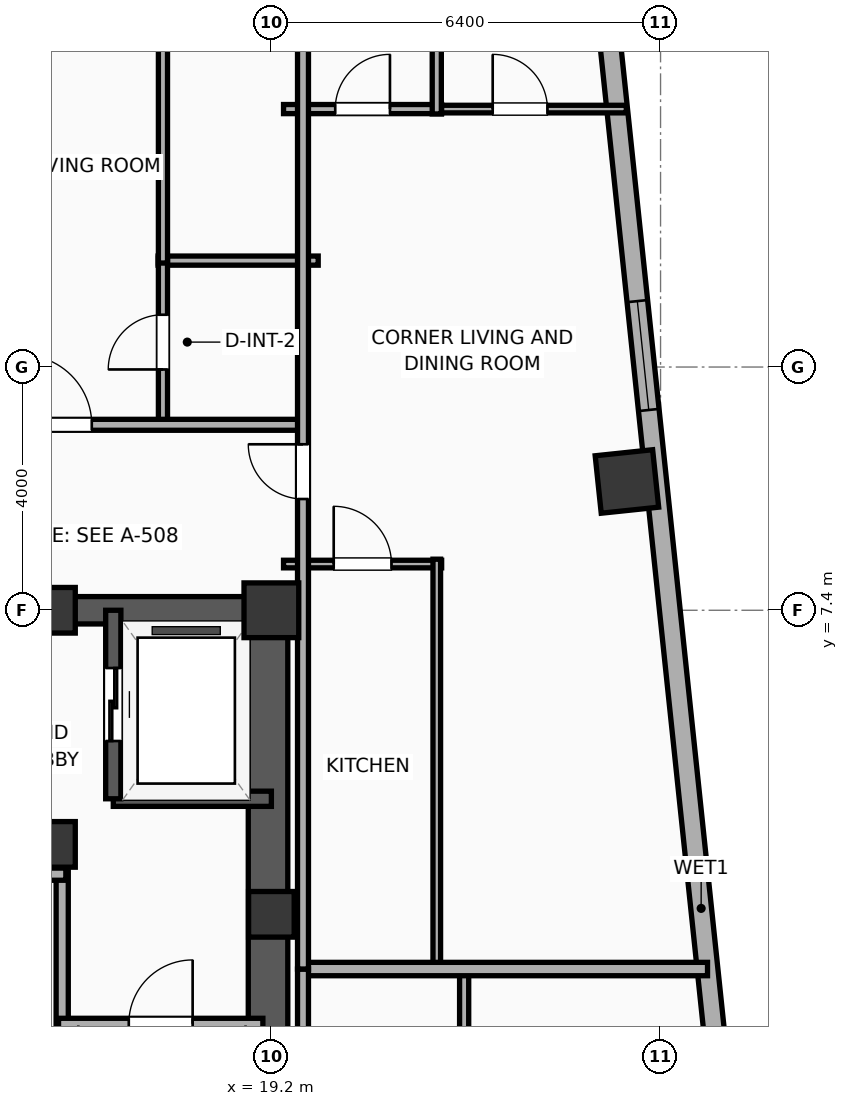
"""IFC4 building model, lengths in metres.
Left out: names, types, materials, properties, quantities, classifications, styles, units other than length and angle.
Written with IfcOpenShell. Run it as: python <this file> out.ifc"""

import sys

from ifc_helpers import new_model, si_unit, direction, frame, frame_2d, origin, origin_2d, place, context, subcontext, project, spatial, rectangle, hollow_rectangle, extrude, element, fill, save


model = new_model("IFC4")
c1 = context("Model", 3, precision=1e-05, world=origin(), true_north=direction((0.0, 1.0)))
c2 = subcontext(c1, "Body", "Model", "MODEL_VIEW")
j1 = project(units=[si_unit("LENGTHUNIT", "METRE"), si_unit("PLANEANGLEUNIT", "RADIAN")], contexts=[c1])
p1 = place(None, origin())
s1 = spatial("IfcSite", under=j1, at=p1, CompositionType="ELEMENT")
p2 = place(p1, origin())
s2 = spatial("IfcBuilding", under=s1, at=p2, CompositionType="ELEMENT")
p3 = place(p2, frame((0.0, 0.0, 163.8)))
s3 = spatial("IfcBuildingStorey", under=s2, at=p3, CompositionType="ELEMENT", Elevation=163.8)
for number, where, z_axis, x_axis in (
    (1, (15.6, 3.55, 0.0), (0.0, 0.0, 1.0), (1.0, 0.0, 0.0)),
    (2, (15.6, 7.4, 0.0), (0.0, 0.0, 1.0), (1.0, 0.0, 0.0)),
    (3, (19.2, 2.4, 0.0), (0.0, 0.0, 1.0), (1.0, 0.0, 0.0)),
):
    element("IfcColumn", number, at=place(p3, frame(where, z_axis=z_axis, x_axis=x_axis)), inside=s3, PredefinedType="COLUMN", context=c2, shape_type="SweptSolid", body=[
        extrude(rectangle(XDim=0.75, YDim=0.75, at=origin_2d()), origin(), (0.0, 0.0, 1.0), 3.9),
    ])
p4 = place(p3, frame((19.2, 7.4, 0.0), z_axis=(0.0, 0.0, 1.0), x_axis=(1.0, 0.0, 0.0)))
e4 = element("IfcColumn", 4, at=p4, inside=s3, PredefinedType="COLUMN", context=c2, shape_type="SweptSolid", body=[
    extrude(rectangle(XDim=0.9, YDim=0.9, at=origin_2d()), origin(), (0.0, 0.0, 1.0), 3.9),
])
p5 = place(p3, frame((12.175, 7.4, 0.0), z_axis=(0.0, 0.0, 1.0), x_axis=(1.0, 0.0, 0.0)))
e5 = element("IfcWall", 5, at=p5, inside=s3, PredefinedType="SHEAR", context=c2, shape_type="SweptSolid", body=[
    extrude(rectangle(XDim=7.25, YDim=0.45, at=frame_2d((3.625, 0.0))), origin(), (0.0, 0.0, 1.0), 3.65),
])
p6 = place(p3, frame((19.145, -7.4, 0.0), z_axis=(0.0, 0.0, 1.0), x_axis=(0.0, 1.0, 0.0)))
e6 = element("IfcWall", 6, at=p6, inside=s3, PredefinedType="SHEAR", context=c2, shape_type="SweptSolid", body=[
    extrude(rectangle(XDim=14.8, YDim=0.65, at=frame_2d((7.4, 0.0))), origin(), (0.0, 0.0, 1.0), 3.65),
])
p7 = place(p3, frame((15.86, -7.085, 0.0), z_axis=(0.0, 0.0, 1.0), x_axis=(0.0, 1.0, 0.0)))
e7 = element("IfcWall", 7, at=p7, inside=s3, PredefinedType="SOLIDWALL", context=c2, shape_type="SweptSolid", body=[
    extrude(rectangle(XDim=7.685, YDim=0.25, at=frame_2d((3.843, 0.0))), origin(), (0.0, 0.0, 1.0), 3.65),
])
p8 = place(p3, frame((25.047, 9.518, 0.0), z_axis=(0.0, 0.0, 1.0), x_axis=(0.994521895368, 0.104528463268, 0.0)))
e8 = element("IfcColumn", 8, at=p8, inside=s3, PredefinedType="COLUMN", context=c2, shape_type="SweptSolid", body=[
    extrude(hollow_rectangle(XDim=0.95, YDim=0.95, WallThickness=0.032, at=origin_2d()), origin(), (0.0, 0.0, 1.0), 3.9),
])
p9 = place(p3, frame((24.534, 18.99, 0.0), z_axis=(0.0, 0.0, 1.0), x_axis=(0.104534959766, -0.994521212537, 0.0)))
e9 = element("IfcWall", 9, at=p9, inside=s3, PredefinedType="ELEMENTEDWALL", context=c2, shape_type="SweptSolid", body=[
    extrude(rectangle(XDim=33.166, YDim=0.34, at=frame_2d((16.583, 0.0))), origin(), (0.0, 0.0, 1.0), 3.65),
])
p10 = place(p9, frame((6.542, 0.0, 0.75)))
e10 = element("IfcOpeningElement", 10, at=p10, cuts=e9, PredefinedType="OPENING", context=c2, shape_type="SweptSolid", body=[
    extrude(rectangle(XDim=1.8, YDim=2.1, at=frame_2d((0.9, 1.05))), frame((0.0, 0.18, 0.0), z_axis=(0.0, -1.0, 0.0), x_axis=(1.0, 0.0, 0.0)), (0.0, 0.0, 1.0), 0.36),
])
p11 = place(p9, frame((24.825, 0.0, 0.75)))
e11 = element("IfcOpeningElement", 11, at=p11, cuts=e9, PredefinedType="OPENING", context=c2, shape_type="SweptSolid", body=[
    extrude(rectangle(XDim=1.8, YDim=2.1, at=frame_2d((0.9, 1.05))), frame((0.0, 0.18, 0.0), z_axis=(0.0, -1.0, 0.0), x_axis=(1.0, 0.0, 0.0)), (0.0, 0.0, 1.0), 0.36),
])
p12 = place(p9, frame((20.332, 0.0, 0.75)))
e12 = element("IfcOpeningElement", 12, at=p12, cuts=e9, PredefinedType="OPENING", context=c2, shape_type="SweptSolid", body=[
    extrude(rectangle(XDim=1.2, YDim=2.05, at=frame_2d((0.6, 1.025))), frame((0.0, 0.18, 0.0), z_axis=(0.0, -1.0, 0.0), x_axis=(1.0, 0.0, 0.0)), (0.0, 0.0, 1.0), 0.36),
])
p13 = place(p3, frame((16.6, 4.3, 0.0), z_axis=(0.0, 0.0, 1.0), x_axis=(1.0, 0.0, 0.0)))
e13 = element("IfcWall", 13, at=p13, inside=s3, PredefinedType="SOLIDWALL", context=c2, shape_type="SweptSolid", body=[
    extrude(rectangle(XDim=2.6, YDim=0.25, at=frame_2d((1.3, 0.0))), origin(), (0.0, 0.0, 1.0), 3.65),
])
p14 = place(p3, frame((16.6, 7.4, 0.0), z_axis=(0.0, 0.0, 1.0), x_axis=(0.0, -1.0, 0.0)))
e14 = element("IfcWall", 14, at=p14, inside=s3, PredefinedType="SOLIDWALL", context=c2, shape_type="SweptSolid", body=[
    extrude(rectangle(XDim=3.1, YDim=0.25, at=frame_2d((1.55, 0.0))), origin(), (0.0, 0.0, 1.0), 3.65),
])
p15 = place(p14, frame((0.95, 0.0, 0.0)))
e15 = element("IfcOpeningElement", 15, at=p15, cuts=e14, PredefinedType="OPENING", context=c2, shape_type="SweptSolid", body=[
    extrude(rectangle(XDim=1.2, YDim=2.05, at=frame_2d((0.6, 1.025))), frame((0.0, 0.135, 0.0), z_axis=(0.0, -1.0, 0.0), x_axis=(1.0, 0.0, 0.0)), (0.0, 0.0, 1.0), 0.27),
])
p16 = place(p3, frame((15.76, 0.58, 0.0), z_axis=(0.0, 0.0, 1.0), x_axis=(0.0, 1.0, 0.0)))
e16 = element("IfcWall", 16, at=p16, inside=s3, PredefinedType="PARTITIONING", context=c2, shape_type="SweptSolid", body=[
    extrude(rectangle(XDim=2.52, YDim=0.2, at=frame_2d((1.26, 0.0))), origin(), (0.0, 0.0, 1.0), 3.65),
])
p17 = place(p3, frame((12.66, 3.06, 0.0), z_axis=(0.0, 0.0, 1.0), x_axis=(1.0, 0.0, 0.0)))
e17 = element("IfcWall", 17, at=p17, inside=s3, PredefinedType="PARTITIONING", context=c2, shape_type="SweptSolid", body=[
    extrude(rectangle(XDim=3.16, YDim=0.2, at=frame_2d((1.58, 0.0))), origin(), (0.0, 0.0, 1.0), 3.65),
])
p18 = place(p3, frame((15.7, 0.6, 0.0), z_axis=(0.0, 0.0, 1.0), x_axis=(1.0, 0.0, 0.0)))
e18 = element("IfcWall", 18, at=p18, inside=s3, PredefinedType="PARTITIONING", context=c2, shape_type="SweptSolid", body=[
    extrude(rectangle(XDim=3.36, YDim=0.18, at=frame_2d((1.68, 0.0))), origin(), (0.0, 0.0, 1.0), 3.65),
])
p19 = place(p18, frame((1.155, 0.0, 0.0)))
e19 = element("IfcOpeningElement", 19, at=p19, cuts=e18, PredefinedType="OPENING", context=c2, shape_type="SweptSolid", body=[
    extrude(rectangle(XDim=1.05, YDim=2.05, at=frame_2d((0.525, 1.025))), frame((0.0, 0.1, 0.0), z_axis=(0.0, -1.0, 0.0), x_axis=(1.0, 0.0, 0.0)), (0.0, 0.0, 1.0), 0.2),
])
p20 = place(p3, frame((17.337, 13.15, 0.0), z_axis=(0.0, 0.0, 1.0), x_axis=(1.0, 0.0, 0.0)))
e20 = element("IfcWall", 20, at=p20, inside=s3, PredefinedType="PLUMBINGWALL", context=c2, shape_type="SweptSolid", body=[
    extrude(rectangle(XDim=2.633, YDim=0.15, at=frame_2d((1.316, 0.0))), origin(), (0.0, 0.0, 1.0), 3.65),
])
p21 = place(p3, frame((17.417, 10.43, 0.0), z_axis=(0.0, 0.0, 1.0), x_axis=(0.0, 1.0, 0.0)))
e21 = element("IfcWall", 21, at=p21, inside=s3, PredefinedType="PLUMBINGWALL", context=c2, shape_type="SweptSolid", body=[
    extrude(rectangle(XDim=2.76, YDim=0.15, at=frame_2d((1.38, 0.0))), origin(), (0.0, 0.0, 1.0), 3.65),
])
p22 = place(p21, frame((0.93, 0.0, 0.0)))
e22 = element("IfcOpeningElement", 22, at=p22, cuts=e21, PredefinedType="OPENING", context=c2, shape_type="SweptSolid", body=[
    extrude(rectangle(XDim=0.9, YDim=2.05, at=frame_2d((0.45, 1.025))), frame((0.0, 0.085, 0.0), z_axis=(0.0, -1.0, 0.0), x_axis=(1.0, 0.0, 0.0)), (0.0, 0.0, 1.0), 0.17),
])
p23 = place(p3, frame((17.417, 13.11, 0.0), z_axis=(0.0, 0.0, 1.0), x_axis=(0.0, 1.0, 0.0)))
e23 = element("IfcWall", 23, at=p23, inside=s3, PredefinedType="PLUMBINGWALL", context=c2, shape_type="SweptSolid", body=[
    extrude(rectangle(XDim=8.949, YDim=0.15, at=frame_2d((4.475, 0.0))), origin(), (0.0, 0.0, 1.0), 3.65),
])
p24 = place(p23, frame((4.025, 0.0, 0.0)))
e24 = element("IfcOpeningElement", 24, at=p24, cuts=e23, PredefinedType="OPENING", context=c2, shape_type="SweptSolid", body=[
    extrude(rectangle(XDim=0.9, YDim=2.05, at=frame_2d((0.45, 1.025))), frame((0.0, 0.085, 0.0), z_axis=(0.0, -1.0, 0.0), x_axis=(1.0, 0.0, 0.0)), (0.0, 0.0, 1.0), 0.17),
])
p25 = place(p3, frame((8.08, 10.45, 0.0), z_axis=(0.0, 0.0, 1.0), x_axis=(1.0, 0.0, 0.0)))
e25 = element("IfcWall", 25, at=p25, inside=s3, PredefinedType="PARTITIONING", context=c2, shape_type="SweptSolid", body=[
    extrude(rectangle(XDim=11.67, YDim=0.18, at=frame_2d((5.835, 0.0))), origin(), (0.0, 0.0, 1.0), 3.65),
])
p26 = place(p25, frame((2.604, 0.0, 0.0)))
e26 = element("IfcOpeningElement", 26, at=p26, cuts=e25, PredefinedType="OPENING", context=c2, shape_type="SweptSolid", body=[
    extrude(rectangle(XDim=0.9, YDim=2.05, at=frame_2d((0.45, 1.025))), frame((0.0, 0.1, 0.0), z_axis=(0.0, -1.0, 0.0), x_axis=(1.0, 0.0, 0.0)), (0.0, 0.0, 1.0), 0.2),
])
p27 = place(p25, frame((7.016, 0.0, 0.0)))
e27 = element("IfcOpeningElement", 27, at=p27, cuts=e25, PredefinedType="OPENING", context=c2, shape_type="SweptSolid", body=[
    extrude(rectangle(XDim=1.15, YDim=2.05, at=frame_2d((0.575, 1.025))), frame((0.0, 0.1, 0.0), z_axis=(0.0, -1.0, 0.0), x_axis=(1.0, 0.0, 0.0)), (0.0, 0.0, 1.0), 0.2),
])
p28 = place(p3, frame((22.37, -5.24, 0.0), z_axis=(0.0, 0.0, 1.0), x_axis=(0.0, 1.0, 0.0)))
e28 = element("IfcWall", 28, at=p28, inside=s3, PredefinedType="PLUMBINGWALL", context=c2, shape_type="SweptSolid", body=[
    extrude(rectangle(XDim=6.72, YDim=0.15, at=frame_2d((3.36, 0.0))), origin(), (0.0, 0.0, 1.0), 3.65),
])
p29 = place(p3, frame((21.86, 15.642, 0.0), z_axis=(0.0, 0.0, 1.0), x_axis=(1.0, 0.0, 0.0)))
e29 = element("IfcWall", 29, at=p29, inside=s3, PredefinedType="PARTITIONING", context=c2, shape_type="SweptSolid", body=[
    extrude(rectangle(XDim=3.177, YDim=0.125, at=frame_2d((1.588, 0.0))), origin(), (0.0, 0.0, 1.0), 3.65),
])
p30 = place(p29, frame((0.979, 0.0, 0.0)))
e30 = element("IfcOpeningElement", 30, at=p30, cuts=e29, PredefinedType="OPENING", context=c2, shape_type="SweptSolid", body=[
    extrude(rectangle(XDim=0.9, YDim=2.05, at=frame_2d((0.45, 1.025))), frame((0.0, 0.073, 0.0), z_axis=(0.0, -1.0, 0.0), x_axis=(1.0, 0.0, 0.0)), (0.0, 0.0, 1.0), 0.145),
])
p31 = place(p3, frame((19.4, 8.16, 0.0), z_axis=(0.0, 0.0, 1.0), x_axis=(1.0, 0.0, 0.0)))
e31 = element("IfcWall", 31, at=p31, inside=s3, PredefinedType="PARTITIONING", context=c2, shape_type="SweptSolid", body=[
    extrude(rectangle(XDim=2.6, YDim=0.125, at=frame_2d((1.3, 0.0))), origin(), (0.0, 0.0, 1.0), 3.04),
])
p32 = place(p31, frame((0.825, 0.0, 0.0)))
e32 = element("IfcOpeningElement", 32, at=p32, cuts=e31, PredefinedType="OPENING", context=c2, shape_type="SweptSolid", body=[
    extrude(rectangle(XDim=0.95, YDim=2.05, at=frame_2d((0.475, 1.025))), frame((0.0, 0.073, 0.0), z_axis=(0.0, -1.0, 0.0), x_axis=(1.0, 0.0, 0.0)), (0.0, 0.0, 1.0), 0.145),
])
p33 = place(p3, frame((19.4, 15.642, 0.0), z_axis=(0.0, 0.0, 1.0), x_axis=(1.0, 0.0, 0.0)))
e33 = element("IfcWall", 33, at=p33, inside=s3, PredefinedType="PLUMBINGWALL", context=c2, shape_type="SweptSolid", body=[
    extrude(rectangle(XDim=2.6, YDim=0.15, at=frame_2d((1.3, 0.0))), origin(), (0.0, 0.0, 1.0), 3.65),
])
p34 = place(p33, frame((0.85, 0.0, 0.0)))
e34 = element("IfcOpeningElement", 34, at=p34, cuts=e33, PredefinedType="OPENING", context=c2, shape_type="SweptSolid", body=[
    extrude(rectangle(XDim=0.9, YDim=2.05, at=frame_2d((0.45, 1.025))), frame((0.0, 0.085, 0.0), z_axis=(0.0, -1.0, 0.0), x_axis=(1.0, 0.0, 0.0)), (0.0, 0.0, 1.0), 0.17),
])
p35 = place(p3, frame((21.92, 1.52, 0.0), z_axis=(0.0, 0.0, 1.0), x_axis=(0.0, 1.0, 0.0)))
e35 = element("IfcWall", 35, at=p35, inside=s3, PredefinedType="PARTITIONING", context=c2, shape_type="SweptSolid", body=[
    extrude(rectangle(XDim=6.72, YDim=0.125, at=frame_2d((3.36, 0.0))), origin(), (0.0, 0.0, 1.0), 3.65),
])
p36 = place(p3, frame((21.92, 15.562, 0.0), z_axis=(0.0, 0.0, 1.0), x_axis=(0.0, 1.0, 0.0)))
e36 = element("IfcWall", 36, at=p36, inside=s3, PredefinedType="PLUMBINGWALL", context=c2, shape_type="SweptSolid", body=[
    extrude(rectangle(XDim=6.696, YDim=0.15, at=frame_2d((3.348, 0.0))), origin(), (0.0, 0.0, 1.0), 3.04),
])
p37 = place(p3, frame((19.72, 1.5, 0.0), z_axis=(0.0, 0.0, 1.0), x_axis=(1.0, 0.0, 0.0)))
e37 = element("IfcWall", 37, at=p37, inside=s3, PredefinedType="PARTITIONING", context=c2, shape_type="SweptSolid", body=[
    extrude(rectangle(XDim=6.653, YDim=0.22, at=frame_2d((3.326, 0.0))), origin(), (0.0, 0.0, 1.0), 3.65),
])
p38 = place(p3, frame((19.72, -18.532, 0.0), z_axis=(0.0, 0.0, 1.0), x_axis=(0.0, 1.0, 0.0)))
e38 = element("IfcWall", 38, at=p38, inside=s3, PredefinedType="PARTITIONING", context=c2, shape_type="SweptSolid", body=[
    extrude(rectangle(XDim=20.032, YDim=0.18, at=frame_2d((10.016, 0.0))), origin(), (0.0, 0.0, 1.0), 3.65),
])
p39 = place(p38, frame((8.402, 0.0, 0.0)))
e39 = element("IfcOpeningElement", 39, at=p39, cuts=e38, PredefinedType="OPENING", context=c2, shape_type="SweptSolid", body=[
    extrude(rectangle(XDim=0.9, YDim=2.05, at=frame_2d((0.45, 1.025))), frame((0.0, 0.1, 0.0), z_axis=(0.0, -1.0, 0.0), x_axis=(1.0, 0.0, 0.0)), (0.0, 0.0, 1.0), 0.2),
])
p40 = place(p3, frame((19.72, 1.5, 0.0), z_axis=(0.0, 0.0, 1.0), x_axis=(0.0, 1.0, 0.0)))
e40 = element("IfcWall", 40, at=p40, inside=s3, PredefinedType="PARTITIONING", context=c2, shape_type="SweptSolid", body=[
    extrude(rectangle(XDim=20.65, YDim=0.18, at=frame_2d((10.325, 0.0))), origin(), (0.0, 0.0, 1.0), 3.04),
])
p41 = place(p40, frame((7.729, 0.0, 0.0)))
e41 = element("IfcOpeningElement", 41, at=p41, cuts=e40, PredefinedType="OPENING", context=c2, shape_type="SweptSolid", body=[
    extrude(rectangle(XDim=0.9, YDim=2.05, at=frame_2d((0.45, 1.025))), frame((0.0, 0.1, 0.0), z_axis=(0.0, -1.0, 0.0), x_axis=(1.0, 0.0, 0.0)), (0.0, 0.0, 1.0), 0.2),
])
p42 = place(p10, origin())
e42 = element("IfcWindow", 42, at=p42, inside=s3, PartitioningType="SINGLE_PANEL", PredefinedType="WINDOW", context=c2, shape_type="SweptSolid", body=[
    extrude(rectangle(XDim=1.8, YDim=2.1, at=frame_2d((0.9, 1.05))), frame((0.0, 0.03, 0.0), z_axis=(0.0, -1.0, 0.0), x_axis=(1.0, 0.0, 0.0)), (0.0, 0.0, 1.0), 0.06),
])
fill(e10, e42)
p43 = place(p15, origin())
e43 = element("IfcDoor", 43, at=p43, inside=s3, OperationType="SLIDING_TO_LEFT", PredefinedType="DOOR", context=c2, shape_type="SweptSolid", body=[
    extrude(rectangle(XDim=1.2, YDim=2.05, at=frame_2d((0.6, 1.025))), frame((0.0, 0.025, 0.0), z_axis=(0.0, -1.0, 0.0), x_axis=(1.0, 0.0, 0.0)), (0.0, 0.0, 1.0), 0.05),
])
fill(e15, e43)
p44 = place(p19, origin())
e44 = element("IfcDoor", 44, at=p44, inside=s3, OperationType="SINGLE_SWING_RIGHT", PredefinedType="DOOR", context=c2, shape_type="SweptSolid", body=[
    extrude(rectangle(XDim=1.05, YDim=2.05, at=frame_2d((0.525, 1.025))), frame((0.0, 0.025, 0.0), z_axis=(0.0, -1.0, 0.0), x_axis=(1.0, 0.0, 0.0)), (0.0, 0.0, 1.0), 0.05),
])
fill(e19, e44)
p45 = place(p22, origin())
e45 = element("IfcDoor", 45, at=p45, inside=s3, OperationType="SINGLE_SWING_LEFT", PredefinedType="DOOR", context=c2, shape_type="SweptSolid", body=[
    extrude(rectangle(XDim=0.9, YDim=2.05, at=frame_2d((0.45, 1.025))), frame((0.0, 0.025, 0.0), z_axis=(0.0, -1.0, 0.0), x_axis=(1.0, 0.0, 0.0)), (0.0, 0.0, 1.0), 0.05),
])
fill(e22, e45)
p46 = place(p27, origin())
e46 = element("IfcDoor", 46, at=p46, inside=s3, OperationType="SINGLE_SWING_LEFT", PredefinedType="DOOR", context=c2, shape_type="SweptSolid", body=[
    extrude(rectangle(XDim=1.15, YDim=2.05, at=frame_2d((0.575, 1.025))), frame((0.0, 0.025, 0.0), z_axis=(0.0, -1.0, 0.0), x_axis=(1.0, 0.0, 0.0)), (0.0, 0.0, 1.0), 0.05),
])
fill(e27, e46)
p47 = place(p30, origin())
e47 = element("IfcDoor", 47, at=p47, inside=s3, OperationType="SINGLE_SWING_LEFT", PredefinedType="DOOR", context=c2, shape_type="SweptSolid", body=[
    extrude(rectangle(XDim=0.9, YDim=2.05, at=frame_2d((0.45, 1.025))), frame((0.0, 0.025, 0.0), z_axis=(0.0, -1.0, 0.0), x_axis=(1.0, 0.0, 0.0)), (0.0, 0.0, 1.0), 0.05),
])
fill(e30, e47)
p48 = place(p32, origin())
e48 = element("IfcDoor", 48, at=p48, inside=s3, OperationType="SINGLE_SWING_LEFT", PredefinedType="DOOR", context=c2, shape_type="SweptSolid", body=[
    extrude(rectangle(XDim=0.95, YDim=2.05, at=frame_2d((0.475, 1.025))), frame((0.0, 0.025, 0.0), z_axis=(0.0, -1.0, 0.0), x_axis=(1.0, 0.0, 0.0)), (0.0, 0.0, 1.0), 0.05),
])
fill(e32, e48)
p49 = place(p34, origin())
e49 = element("IfcDoor", 49, at=p49, inside=s3, OperationType="SINGLE_SWING_RIGHT", PredefinedType="DOOR", context=c2, shape_type="SweptSolid", body=[
    extrude(rectangle(XDim=0.9, YDim=2.05, at=frame_2d((0.45, 1.025))), frame((0.0, 0.025, 0.0), z_axis=(0.0, -1.0, 0.0), x_axis=(1.0, 0.0, 0.0)), (0.0, 0.0, 1.0), 0.05),
])
fill(e34, e49)
p50 = place(p41, origin())
e50 = element("IfcDoor", 50, at=p50, inside=s3, OperationType="SINGLE_SWING_RIGHT", PredefinedType="DOOR", context=c2, shape_type="SweptSolid", body=[
    extrude(rectangle(XDim=0.9, YDim=2.05, at=frame_2d((0.45, 1.025))), frame((0.0, 0.025, 0.0), z_axis=(0.0, -1.0, 0.0), x_axis=(1.0, 0.0, 0.0)), (0.0, 0.0, 1.0), 0.05),
])
fill(e41, e50)
save(model, sys.argv[1])
